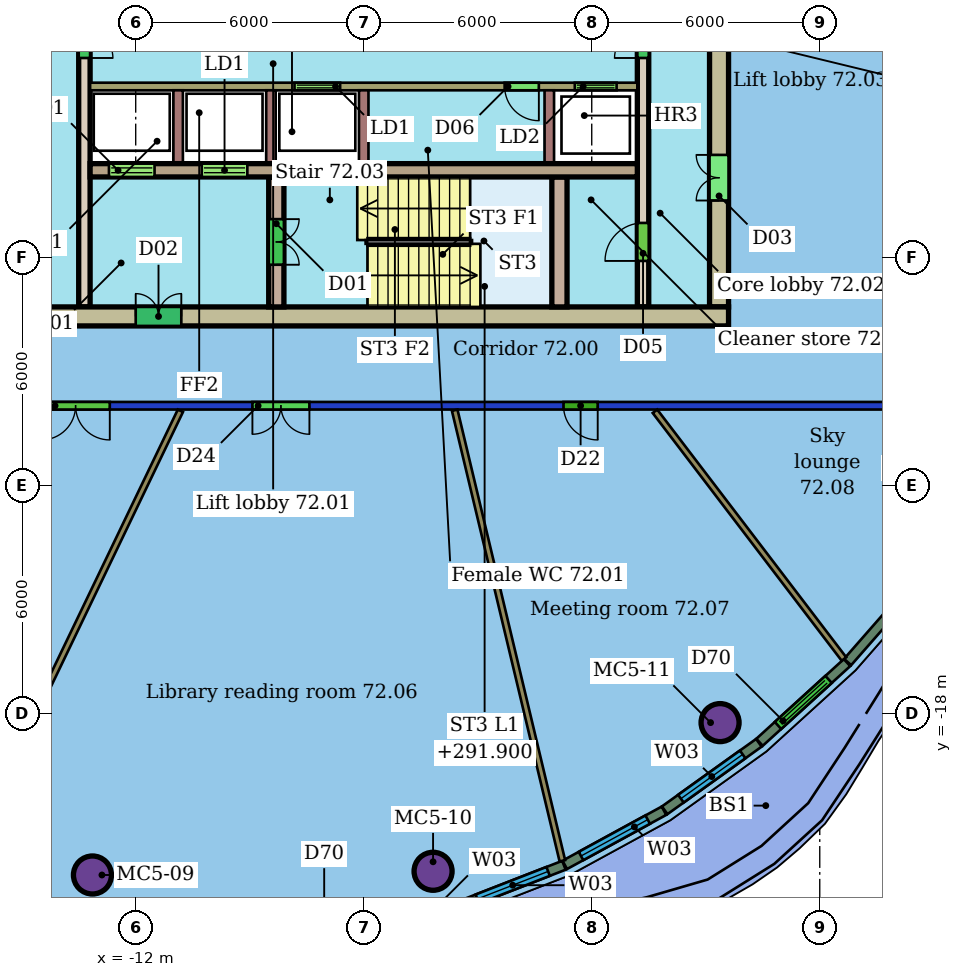
"""IFC4 building model, lengths in metres.
Left out: names, types, materials, properties, quantities, classifications, styles, units other than length and angle.
Written with IfcOpenShell. Run it as: python <this file> out.ifc"""

import sys

from ifc_helpers import new_model, si_unit, direction, frame, frame_2d, origin, origin_2d, place, context, subcontext, project, spatial, rectangle, hollow_circle, extrude, element, fill, save


model = new_model("IFC4")
c1 = context("Model", 3, precision=1e-05, world=origin(), true_north=direction((0.0, 1.0)))
c2 = subcontext(c1, "Body", "Model", "MODEL_VIEW")
j1 = project(units=[si_unit("LENGTHUNIT", "METRE"), si_unit("PLANEANGLEUNIT", "RADIAN")], contexts=[c1])
p1 = place(None, origin())
s1 = spatial("IfcSite", under=j1, at=p1, CompositionType="ELEMENT")
p2 = place(p1, origin())
s2 = spatial("IfcBuilding", under=s1, at=p2, CompositionType="ELEMENT")
p3 = place(p2, frame((0.0, 0.0, 290.1)))
s3 = spatial("IfcBuildingStorey", under=s2, at=p3, CompositionType="ELEMENT", Elevation=290.1)
for number, where, z_axis, x_axis in (
    (1, (-13.138, -22.247, 0.0), (0.0, 0.0, 1.0), (1.0, 0.0, 0.0)),
    (2, (-4.175, -22.149, 0.0), (0.0, 0.0, 1.0), (1.0, 0.0, 0.0)),
    (3, (3.377, -18.238, 0.0), (0.0, 0.0, 1.0), (1.0, 0.0, 0.0)),
):
    element("IfcColumn", number, at=place(p3, frame(where, z_axis=z_axis, x_axis=x_axis)), inside=s3, PredefinedType="COLUMN", context=c2, shape_type="SweptSolid", body=[
        extrude(hollow_circle(Radius=0.5, WallThickness=0.04, at=origin_2d()), origin(), (0.0, 0.0, 1.0), 3.45),
    ])
p4 = place(p3, frame((8.4, -9.9, 0.0), z_axis=(0.0, 0.0, 1.0), x_axis=(-1.0, 0.0, 0.0)))
e4 = element("IfcWall", 4, at=p4, inside=s3, PredefinedType="PARTITIONING", context=c2, shape_type="SweptSolid", body=[
    extrude(rectangle(XDim=28.8, YDim=0.2, at=frame_2d((14.4, 0.0))), origin(), (0.0, 0.0, 1.0), 3.1),
])
p5 = place(p4, frame((21.082, 0.0, 0.0)))
e5 = element("IfcOpeningElement", 5, at=p5, cuts=e4, PredefinedType="OPENING", context=c2, shape_type="SweptSolid", body=[
    extrude(rectangle(XDim=1.8, YDim=2.4, at=frame_2d((0.9, 1.2))), frame((0.0, 0.11, 0.0), z_axis=(0.0, -1.0, 0.0), x_axis=(1.0, 0.0, 0.0)), (0.0, 0.0, 1.0), 0.22),
])
p6 = place(p4, frame((15.829, 0.0, 0.0)))
e6 = element("IfcOpeningElement", 6, at=p6, cuts=e4, PredefinedType="OPENING", context=c2, shape_type="SweptSolid", body=[
    extrude(rectangle(XDim=1.5, YDim=2.1, at=frame_2d((0.75, 1.05))), frame((0.0, 0.11, 0.0), z_axis=(0.0, -1.0, 0.0), x_axis=(1.0, 0.0, 0.0)), (0.0, 0.0, 1.0), 0.22),
])
p7 = place(p4, frame((8.243, 0.0, 0.0)))
e7 = element("IfcOpeningElement", 7, at=p7, cuts=e4, PredefinedType="OPENING", context=c2, shape_type="SweptSolid", body=[
    extrude(rectangle(XDim=0.9, YDim=2.1, at=frame_2d((0.45, 1.05))), frame((0.0, 0.11, 0.0), z_axis=(0.0, -1.0, 0.0), x_axis=(1.0, 0.0, 0.0)), (0.0, 0.0, 1.0), 0.22),
])
p8 = place(p3, frame((-16.674, -22.198, 0.0), z_axis=(0.0, 0.0, 1.0), x_axis=(0.43334246097, 0.901229333478, 0.0)))
e8 = element("IfcWall", 8, at=p8, inside=s3, PredefinedType="PARTITIONING", context=c2, shape_type="SweptSolid", body=[
    extrude(rectangle(XDim=13.499, YDim=0.15, at=frame_2d((6.75, 0.0))), origin(), (0.0, 0.0, 1.0), 3.45),
])
p9 = place(p3, frame((-0.773, -21.874, 0.0), z_axis=(0.0, 0.0, 1.0), x_axis=(-0.232423713032, 0.972614629553, 0.0)))
e9 = element("IfcWall", 9, at=p9, inside=s3, PredefinedType="PARTITIONING", context=c2, shape_type="SweptSolid", body=[
    extrude(rectangle(XDim=12.19, YDim=0.15, at=frame_2d((6.095, 0.0))), origin(), (0.0, 0.0, 1.0), 3.45),
])
p10 = place(p3, frame((6.637, -16.564, 0.0), z_axis=(0.0, 0.0, 1.0), x_axis=(-0.606535643583, 0.795056295531, 0.0)))
e10 = element("IfcWall", 10, at=p10, inside=s3, PredefinedType="PARTITIONING", context=c2, shape_type="SweptSolid", body=[
    extrude(rectangle(XDim=8.199, YDim=0.15, at=frame_2d((4.1, 0.0))), origin(), (0.0, 0.0, 1.0), 3.45),
])
p11 = place(p3, frame((-3.428, -23.041, 0.0), z_axis=(0.0, 0.0, 1.0), x_axis=(0.931927060947, 0.362645768035, 0.0)))
e11 = element("IfcWall", 11, at=p11, inside=s3, PredefinedType="SOLIDWALL", context=c2, shape_type="SweptSolid", body=[
    extrude(rectangle(XDim=2.894, YDim=0.25, at=frame_2d((1.447, 0.0))), origin(), (0.0, 0.0, 1.0), 3.15),
])
p12 = place(p11, frame((0.447, 0.0, 0.9)))
e12 = element("IfcOpeningElement", 12, at=p12, cuts=e11, PredefinedType="OPENING", context=c2, shape_type="SweptSolid", body=[
    extrude(rectangle(XDim=2.0, YDim=2.1, at=frame_2d((1.0, 1.05))), frame((0.0, 0.135, 0.0), z_axis=(0.0, -1.0, 0.0), x_axis=(1.0, 0.0, 0.0)), (0.0, 0.0, 1.0), 0.27),
])
p13 = place(p3, frame((-0.709, -21.981, 0.0), z_axis=(0.0, 0.0, 1.0), x_axis=(0.877823384271, 0.478984452802, 0.0)))
e13 = element("IfcWall", 13, at=p13, inside=s3, PredefinedType="SOLIDWALL", context=c2, shape_type="SweptSolid", body=[
    extrude(rectangle(XDim=2.973, YDim=0.25, at=frame_2d((1.487, 0.0))), origin(), (0.0, 0.0, 1.0), 3.15),
])
p14 = place(p13, frame((0.487, 0.0, 0.9)))
e14 = element("IfcOpeningElement", 14, at=p14, cuts=e13, PredefinedType="OPENING", context=c2, shape_type="SweptSolid", body=[
    extrude(rectangle(XDim=2.0, YDim=2.1, at=frame_2d((1.0, 1.05))), frame((0.0, 0.135, 0.0), z_axis=(0.0, -1.0, 0.0), x_axis=(1.0, 0.0, 0.0)), (0.0, 0.0, 1.0), 0.27),
])
p15 = place(p3, frame((1.92, -20.544, 0.0), z_axis=(0.0, 0.0, 1.0), x_axis=(0.812910032744, 0.582389284469, 0.0)))
e15 = element("IfcWall", 15, at=p15, inside=s3, PredefinedType="SOLIDWALL", context=c2, shape_type="SweptSolid", body=[
    extrude(rectangle(XDim=3.048, YDim=0.25, at=frame_2d((1.524, 0.0))), origin(), (0.0, 0.0, 1.0), 3.15),
])
p16 = place(p15, frame((0.524, 0.0, 0.9)))
e16 = element("IfcOpeningElement", 16, at=p16, cuts=e15, PredefinedType="OPENING", context=c2, shape_type="SweptSolid", body=[
    extrude(rectangle(XDim=2.0, YDim=2.1, at=frame_2d((1.0, 1.05))), frame((0.0, 0.135, 0.0), z_axis=(0.0, -1.0, 0.0), x_axis=(1.0, 0.0, 0.0)), (0.0, 0.0, 1.0), 0.27),
])
p17 = place(p3, frame((4.416, -18.755, 0.0), z_axis=(0.0, 0.0, 1.0), x_axis=(0.739421840392, 0.673242409502, 0.0)))
e17 = element("IfcWall", 17, at=p17, inside=s3, PredefinedType="SOLIDWALL", context=c2, shape_type="SweptSolid", body=[
    extrude(rectangle(XDim=3.114, YDim=0.25, at=frame_2d((1.557, 0.0))), origin(), (0.0, 0.0, 1.0), 3.15),
])
p18 = place(p17, frame((0.657, 0.0, 0.0)))
e18 = element("IfcOpeningElement", 18, at=p18, cuts=e17, PredefinedType="OPENING", context=c2, shape_type="SweptSolid", body=[
    extrude(rectangle(XDim=1.8, YDim=2.4, at=frame_2d((0.9, 1.2))), frame((0.0, 0.135, 0.0), z_axis=(0.0, -1.0, 0.0), x_axis=(1.0, 0.0, 0.0)), (0.0, 0.0, 1.0), 0.27),
])
p19 = place(p3, frame((6.733, -16.643, 0.0), z_axis=(0.0, 0.0, 1.0), x_axis=(0.658963977512, 0.752174498598, 0.0)))
e19 = element("IfcWall", 19, at=p19, inside=s3, PredefinedType="SOLIDWALL", context=c2, shape_type="SweptSolid", body=[
    extrude(rectangle(XDim=3.122, YDim=0.25, at=frame_2d((1.561, 0.0))), origin(), (0.0, 0.0, 1.0), 3.15),
])
p20 = place(p3, frame((-15.6, -7.55, 0.0), z_axis=(0.0, 0.0, 1.0), x_axis=(1.0, 0.0, 0.0)))
e20 = element("IfcWall", 20, at=p20, inside=s3, PredefinedType="SHEAR", context=c2, shape_type="SweptSolid", body=[
    extrude(rectangle(XDim=19.2, YDim=0.5, at=frame_2d((9.6, 0.0))), origin(), (0.0, 0.0, 1.0), 3.3),
])
p21 = place(p20, frame((3.6, 0.0, 0.0)))
e21 = element("IfcOpeningElement", 21, at=p21, cuts=e20, PredefinedType="OPENING", context=c2, shape_type="SweptSolid", body=[
    extrude(rectangle(XDim=1.2, YDim=2.1, at=frame_2d((0.6, 1.05))), frame((0.0, 0.26, 0.0), z_axis=(0.0, -1.0, 0.0), x_axis=(1.0, 0.0, 0.0)), (0.0, 0.0, 1.0), 0.52),
])
p22 = place(p3, frame((3.35, -7.3, 0.0), z_axis=(0.0, 0.0, 1.0), x_axis=(0.0, 1.0, 0.0)))
e22 = element("IfcWall", 22, at=p22, inside=s3, PredefinedType="SHEAR", context=c2, shape_type="SweptSolid", body=[
    extrude(rectangle(XDim=14.6, YDim=0.5, at=frame_2d((7.3, 0.0))), origin(), (0.0, 0.0, 1.0), 3.3),
])
p23 = place(p22, frame((2.8, 0.0, 0.0)))
e23 = element("IfcOpeningElement", 23, at=p23, cuts=e22, PredefinedType="OPENING", context=c2, shape_type="SweptSolid", body=[
    extrude(rectangle(XDim=1.2, YDim=2.1, at=frame_2d((0.6, 1.05))), frame((0.0, 0.26, 0.0), z_axis=(0.0, -1.0, 0.0), x_axis=(1.0, 0.0, 0.0)), (0.0, 0.0, 1.0), 0.52),
])
p24 = place(p22, frame((10.6, 0.0, 0.0)))
e24 = element("IfcOpeningElement", 24, at=p24, cuts=e22, PredefinedType="OPENING", context=c2, shape_type="SweptSolid", body=[
    extrude(rectangle(XDim=1.2, YDim=2.1, at=frame_2d((0.6, 1.05))), frame((0.0, 0.26, 0.0), z_axis=(0.0, -1.0, 0.0), x_axis=(1.0, 0.0, 0.0)), (0.0, 0.0, 1.0), 0.52),
])
p25 = place(p3, frame((-13.2, -3.705, 0.0), z_axis=(0.0, 0.0, 1.0), x_axis=(1.0, 0.0, 0.0)))
e25 = element("IfcWall", 25, at=p25, inside=s3, PredefinedType="SHEAR", context=c2, shape_type="SweptSolid", body=[
    extrude(rectangle(XDim=7.2, YDim=0.35, at=frame_2d((3.6, 0.0))), origin(), (0.0, 0.0, 1.0), 3.3),
])
p26 = place(p25, frame((0.496, 0.0, 0.0)))
e26 = element("IfcOpeningElement", 26, at=p26, cuts=e25, PredefinedType="OPENING", context=c2, shape_type="SweptSolid", body=[
    extrude(rectangle(XDim=1.2, YDim=2.1, at=frame_2d((0.6, 1.05))), frame((0.0, 0.185, 0.0), z_axis=(0.0, -1.0, 0.0), x_axis=(1.0, 0.0, 0.0)), (0.0, 0.0, 1.0), 0.37),
])
p27 = place(p25, frame((2.938, 0.0, 0.0)))
e27 = element("IfcOpeningElement", 27, at=p27, cuts=e25, PredefinedType="OPENING", context=c2, shape_type="SweptSolid", body=[
    extrude(rectangle(XDim=1.2, YDim=2.1, at=frame_2d((0.6, 1.05))), frame((0.0, 0.185, 0.0), z_axis=(0.0, -1.0, 0.0), x_axis=(1.0, 0.0, 0.0)), (0.0, 0.0, 1.0), 0.37),
])
p28 = place(p3, frame((-6.0, -3.705, 0.0), z_axis=(0.0, 0.0, 1.0), x_axis=(1.0, 0.0, 0.0)))
e28 = element("IfcWall", 28, at=p28, inside=s3, PredefinedType="SHEAR", context=c2, shape_type="SweptSolid", body=[
    extrude(rectangle(XDim=7.2, YDim=0.35, at=frame_2d((3.6, 0.0))), origin(), (0.0, 0.0, 1.0), 3.3),
])
p29 = place(p3, frame((-13.35, 7.3, 0.0), z_axis=(0.0, 0.0, 1.0), x_axis=(0.0, -1.0, 0.0)))
e29 = element("IfcWall", 29, at=p29, inside=s3, PredefinedType="SHEAR", context=c2, shape_type="SweptSolid", body=[
    extrude(rectangle(XDim=14.6, YDim=0.3, at=frame_2d((7.3, 0.0))), origin(), (0.0, 0.0, 1.0), 3.3),
])
p30 = place(p29, frame((6.55, 0.0, 0.0)))
e30 = element("IfcOpeningElement", 30, at=p30, cuts=e29, PredefinedType="OPENING", context=c2, shape_type="SweptSolid", body=[
    extrude(rectangle(XDim=1.5, YDim=2.1, at=frame_2d((0.75, 1.05))), frame((0.0, 0.16, 0.0), z_axis=(0.0, -1.0, 0.0), x_axis=(1.0, 0.0, 0.0)), (0.0, 0.0, 1.0), 0.32),
])
p31 = place(p3, frame((1.35, -7.3, 0.0), z_axis=(0.0, 0.0, 1.0), x_axis=(0.0, 1.0, 0.0)))
e31 = element("IfcWall", 31, at=p31, inside=s3, PredefinedType="SHEAR", context=c2, shape_type="SweptSolid", body=[
    extrude(rectangle(XDim=14.6, YDim=0.3, at=frame_2d((7.3, 0.0))), origin(), (0.0, 0.0, 1.0), 3.3),
])
p32 = place(p31, frame((1.21, 0.0, 0.0)))
e32 = element("IfcOpeningElement", 32, at=p32, cuts=e31, PredefinedType="OPENING", context=c2, shape_type="SweptSolid", body=[
    extrude(rectangle(XDim=1.0, YDim=2.1, at=frame_2d((0.5, 1.05))), frame((0.0, 0.16, 0.0), z_axis=(0.0, -1.0, 0.0), x_axis=(1.0, 0.0, 0.0)), (0.0, 0.0, 1.0), 0.32),
])
p33 = place(p31, frame((6.55, 0.0, 0.0)))
e33 = element("IfcOpeningElement", 33, at=p33, cuts=e31, PredefinedType="OPENING", context=c2, shape_type="SweptSolid", body=[
    extrude(rectangle(XDim=1.5, YDim=2.1, at=frame_2d((0.75, 1.05))), frame((0.0, 0.16, 0.0), z_axis=(0.0, -1.0, 0.0), x_axis=(1.0, 0.0, 0.0)), (0.0, 0.0, 1.0), 0.32),
])
p34 = place(p3, frame((1.2, -1.5, 0.0), z_axis=(0.0, 0.0, 1.0), x_axis=(-1.0, 0.0, 0.0)))
e34 = element("IfcWall", 34, at=p34, inside=s3, PredefinedType="SHEAR", context=c2, shape_type="SweptSolid", body=[
    extrude(rectangle(XDim=14.4, YDim=0.2, at=frame_2d((7.2, 0.0))), origin(), (0.0, 0.0, 1.0), 3.3),
])
p35 = place(p34, frame((7.821, 0.0, 0.0)))
e35 = element("IfcOpeningElement", 35, at=p35, cuts=e34, PredefinedType="OPENING", context=c2, shape_type="SweptSolid", body=[
    extrude(rectangle(XDim=1.2, YDim=2.1, at=frame_2d((0.6, 1.05))), frame((0.0, 0.11, 0.0), z_axis=(0.0, -1.0, 0.0), x_axis=(1.0, 0.0, 0.0)), (0.0, 0.0, 1.0), 0.22),
])
p36 = place(p34, frame((0.546, 0.0, 0.0)))
e36 = element("IfcOpeningElement", 36, at=p36, cuts=e34, PredefinedType="OPENING", context=c2, shape_type="SweptSolid", body=[
    extrude(rectangle(XDim=1.1, YDim=2.1, at=frame_2d((0.55, 1.05))), frame((0.0, 0.11, 0.0), z_axis=(0.0, -1.0, 0.0), x_axis=(1.0, 0.0, 0.0)), (0.0, 0.0, 1.0), 0.22),
])
p37 = place(p34, frame((2.592, 0.0, 0.0)))
e37 = element("IfcOpeningElement", 37, at=p37, cuts=e34, PredefinedType="OPENING", context=c2, shape_type="SweptSolid", body=[
    extrude(rectangle(XDim=0.9, YDim=2.1, at=frame_2d((0.45, 1.05))), frame((0.0, 0.11, 0.0), z_axis=(0.0, -1.0, 0.0), x_axis=(1.0, 0.0, 0.0)), (0.0, 0.0, 1.0), 0.22),
])
p38 = place(p3, frame((-8.3, -3.88, 0.0), z_axis=(0.0, 0.0, 1.0), x_axis=(0.0, -1.0, 0.0)))
e38 = element("IfcWall", 38, at=p38, inside=s3, PredefinedType="SHEAR", context=c2, shape_type="SweptSolid", body=[
    extrude(rectangle(XDim=3.42, YDim=0.4, at=frame_2d((1.71, 0.0))), origin(), (0.0, 0.0, 1.0), 3.3),
])
p39 = place(p38, frame((1.11, 0.0, 0.0)))
e39 = element("IfcOpeningElement", 39, at=p39, cuts=e38, PredefinedType="OPENING", context=c2, shape_type="SweptSolid", body=[
    extrude(rectangle(XDim=1.2, YDim=2.1, at=frame_2d((0.6, 1.05))), frame((0.0, 0.21, 0.0), z_axis=(0.0, -1.0, 0.0), x_axis=(1.0, 0.0, 0.0)), (0.0, 0.0, 1.0), 0.42),
])
p40 = place(p3, frame((-0.85, -3.88, 0.0), z_axis=(0.0, 0.0, 1.0), x_axis=(0.0, -1.0, 0.0)))
e40 = element("IfcWall", 40, at=p40, inside=s3, PredefinedType="SHEAR", context=c2, shape_type="SweptSolid", body=[
    extrude(rectangle(XDim=3.42, YDim=0.4, at=frame_2d((1.71, 0.0))), origin(), (0.0, 0.0, 1.0), 3.3),
])
for number, where, z_axis, x_axis in (
    (41, (-10.883, -1.6, 0.0), (0.0, 0.0, 1.0), (0.0, -1.0, 0.0)),
    (42, (-8.442, -1.6, 0.0), (0.0, 0.0, 1.0), (0.0, -1.0, 0.0)),
    (43, (-6.0, -1.6, 0.0), (0.0, 0.0, 1.0), (0.0, -1.0, 0.0)),
    (44, (-1.117, -1.6, 0.0), (0.0, 0.0, 1.0), (0.0, -1.0, 0.0)),
):
    element("IfcWall", number, at=place(p3, frame(where, z_axis=z_axis, x_axis=x_axis)), inside=s3, PredefinedType="SHEAR", context=c2, shape_type="SweptSolid", body=[
        extrude(rectangle(XDim=1.93, YDim=0.25, at=frame_2d((0.965, 0.0))), origin(), (0.0, 0.0, 1.0), 3.3),
    ])
p41 = place(p5, origin())
e45 = element("IfcDoor", 45, at=p41, inside=s3, OperationType="DOUBLE_DOOR_SINGLE_SWING", PredefinedType="DOOR", context=c2, shape_type="SweptSolid", body=[
    extrude(rectangle(XDim=1.8, YDim=2.4, at=frame_2d((0.9, 1.2))), frame((0.0, 0.025, 0.0), z_axis=(0.0, -1.0, 0.0), x_axis=(1.0, 0.0, 0.0)), (0.0, 0.0, 1.0), 0.05),
])
fill(e5, e45)
p42 = place(p6, origin())
e46 = element("IfcDoor", 46, at=p42, inside=s3, OperationType="DOUBLE_DOOR_SINGLE_SWING", PredefinedType="DOOR", context=c2, shape_type="SweptSolid", body=[
    extrude(rectangle(XDim=1.5, YDim=2.1, at=frame_2d((0.75, 1.05))), frame((0.0, 0.025, 0.0), z_axis=(0.0, -1.0, 0.0), x_axis=(1.0, 0.0, 0.0)), (0.0, 0.0, 1.0), 0.05),
])
fill(e6, e46)
p43 = place(p7, origin())
e47 = element("IfcDoor", 47, at=p43, inside=s3, OperationType="SINGLE_SWING_LEFT", PredefinedType="DOOR", context=c2, shape_type="SweptSolid", body=[
    extrude(rectangle(XDim=0.9, YDim=2.1, at=frame_2d((0.45, 1.05))), frame((0.0, 0.025, 0.0), z_axis=(0.0, -1.0, 0.0), x_axis=(1.0, 0.0, 0.0)), (0.0, 0.0, 1.0), 0.05),
])
fill(e7, e47)
p44 = place(p12, origin())
e48 = element("IfcWindow", 48, at=p44, inside=s3, PartitioningType="SINGLE_PANEL", PredefinedType="WINDOW", context=c2, shape_type="SweptSolid", body=[
    extrude(rectangle(XDim=2.0, YDim=2.1, at=frame_2d((1.0, 1.05))), frame((0.0, 0.03, 0.0), z_axis=(0.0, -1.0, 0.0), x_axis=(1.0, 0.0, 0.0)), (0.0, 0.0, 1.0), 0.06),
])
fill(e12, e48)
p45 = place(p14, origin())
e49 = element("IfcWindow", 49, at=p45, inside=s3, PartitioningType="SINGLE_PANEL", PredefinedType="WINDOW", context=c2, shape_type="SweptSolid", body=[
    extrude(rectangle(XDim=2.0, YDim=2.1, at=frame_2d((1.0, 1.05))), frame((0.0, 0.03, 0.0), z_axis=(0.0, -1.0, 0.0), x_axis=(1.0, 0.0, 0.0)), (0.0, 0.0, 1.0), 0.06),
])
fill(e14, e49)
p46 = place(p16, origin())
e50 = element("IfcWindow", 50, at=p46, inside=s3, PartitioningType="SINGLE_PANEL", PredefinedType="WINDOW", context=c2, shape_type="SweptSolid", body=[
    extrude(rectangle(XDim=2.0, YDim=2.1, at=frame_2d((1.0, 1.05))), frame((0.0, 0.03, 0.0), z_axis=(0.0, -1.0, 0.0), x_axis=(1.0, 0.0, 0.0)), (0.0, 0.0, 1.0), 0.06),
])
fill(e16, e50)
p47 = place(p18, origin())
e51 = element("IfcDoor", 51, at=p47, inside=s3, OperationType="DOUBLE_DOOR_SLIDING", PredefinedType="DOOR", context=c2, shape_type="SweptSolid", body=[
    extrude(rectangle(XDim=1.8, YDim=2.4, at=frame_2d((0.9, 1.2))), frame((0.0, 0.025, 0.0), z_axis=(0.0, -1.0, 0.0), x_axis=(1.0, 0.0, 0.0)), (0.0, 0.0, 1.0), 0.05),
])
fill(e18, e51)
p48 = place(p21, origin())
e52 = element("IfcDoor", 52, at=p48, inside=s3, OperationType="DOUBLE_DOOR_SINGLE_SWING", PredefinedType="NOTDEFINED", context=c2, shape_type="SweptSolid", body=[
    extrude(rectangle(XDim=1.2, YDim=2.1, at=frame_2d((0.6, 1.05))), frame((0.0, 0.025, 0.0), z_axis=(0.0, -1.0, 0.0), x_axis=(1.0, 0.0, 0.0)), (0.0, 0.0, 1.0), 0.05),
])
fill(e21, e52)
p49 = place(p23, origin())
e53 = element("IfcDoor", 53, at=p49, inside=s3, OperationType="DOUBLE_DOOR_SINGLE_SWING", PredefinedType="NOTDEFINED", context=c2, shape_type="SweptSolid", body=[
    extrude(rectangle(XDim=1.2, YDim=2.1, at=frame_2d((0.6, 1.05))), frame((0.0, 0.025, 0.0), z_axis=(0.0, -1.0, 0.0), x_axis=(1.0, 0.0, 0.0)), (0.0, 0.0, 1.0), 0.05),
])
fill(e23, e53)
p50 = place(p26, origin())
e54 = element("IfcDoor", 54, at=p50, inside=s3, OperationType="DOUBLE_DOOR_SLIDING", PredefinedType="NOTDEFINED", context=c2, shape_type="SweptSolid", body=[
    extrude(rectangle(XDim=1.2, YDim=2.1, at=frame_2d((0.6, 1.05))), frame((0.0, 0.025, 0.0), z_axis=(0.0, -1.0, 0.0), x_axis=(1.0, 0.0, 0.0)), (0.0, 0.0, 1.0), 0.05),
])
fill(e26, e54)
p51 = place(p27, origin())
e55 = element("IfcDoor", 55, at=p51, inside=s3, OperationType="DOUBLE_DOOR_SLIDING", PredefinedType="NOTDEFINED", context=c2, shape_type="SweptSolid", body=[
    extrude(rectangle(XDim=1.2, YDim=2.1, at=frame_2d((0.6, 1.05))), frame((0.0, 0.025, 0.0), z_axis=(0.0, -1.0, 0.0), x_axis=(1.0, 0.0, 0.0)), (0.0, 0.0, 1.0), 0.05),
])
fill(e27, e55)
p52 = place(p30, origin())
e56 = element("IfcDoor", 56, at=p52, inside=s3, OperationType="DOUBLE_DOOR_SINGLE_SWING", PredefinedType="NOTDEFINED", context=c2, shape_type="SweptSolid", body=[
    extrude(rectangle(XDim=1.5, YDim=2.1, at=frame_2d((0.75, 1.05))), frame((0.0, 0.025, 0.0), z_axis=(0.0, -1.0, 0.0), x_axis=(1.0, 0.0, 0.0)), (0.0, 0.0, 1.0), 0.05),
])
fill(e30, e56)
p53 = place(p32, origin())
e57 = element("IfcDoor", 57, at=p53, inside=s3, OperationType="SINGLE_SWING_LEFT", PredefinedType="NOTDEFINED", context=c2, shape_type="SweptSolid", body=[
    extrude(rectangle(XDim=1.0, YDim=2.1, at=frame_2d((0.5, 1.05))), frame((0.0, 0.025, 0.0), z_axis=(0.0, -1.0, 0.0), x_axis=(1.0, 0.0, 0.0)), (0.0, 0.0, 1.0), 0.05),
])
fill(e32, e57)
p54 = place(p33, origin())
e58 = element("IfcDoor", 58, at=p54, inside=s3, OperationType="DOUBLE_DOOR_SINGLE_SWING", PredefinedType="NOTDEFINED", context=c2, shape_type="SweptSolid", body=[
    extrude(rectangle(XDim=1.5, YDim=2.1, at=frame_2d((0.75, 1.05))), frame((0.0, 0.025, 0.0), z_axis=(0.0, -1.0, 0.0), x_axis=(1.0, 0.0, 0.0)), (0.0, 0.0, 1.0), 0.05),
])
fill(e33, e58)
p55 = place(p35, origin())
e59 = element("IfcDoor", 59, at=p55, inside=s3, OperationType="DOUBLE_DOOR_SLIDING", PredefinedType="NOTDEFINED", context=c2, shape_type="SweptSolid", body=[
    extrude(rectangle(XDim=1.2, YDim=2.1, at=frame_2d((0.6, 1.05))), frame((0.0, 0.025, 0.0), z_axis=(0.0, -1.0, 0.0), x_axis=(1.0, 0.0, 0.0)), (0.0, 0.0, 1.0), 0.05),
])
fill(e35, e59)
p56 = place(p36, origin())
e60 = element("IfcDoor", 60, at=p56, inside=s3, OperationType="DOUBLE_DOOR_SLIDING", PredefinedType="NOTDEFINED", context=c2, shape_type="SweptSolid", body=[
    extrude(rectangle(XDim=1.1, YDim=2.1, at=frame_2d((0.55, 1.05))), frame((0.0, 0.025, 0.0), z_axis=(0.0, -1.0, 0.0), x_axis=(1.0, 0.0, 0.0)), (0.0, 0.0, 1.0), 0.05),
])
fill(e36, e60)
p57 = place(p37, origin())
e61 = element("IfcDoor", 61, at=p57, inside=s3, OperationType="SINGLE_SWING_LEFT", PredefinedType="NOTDEFINED", context=c2, shape_type="SweptSolid", body=[
    extrude(rectangle(XDim=0.9, YDim=2.1, at=frame_2d((0.45, 1.05))), frame((0.0, 0.025, 0.0), z_axis=(0.0, -1.0, 0.0), x_axis=(1.0, 0.0, 0.0)), (0.0, 0.0, 1.0), 0.05),
])
fill(e37, e61)
p58 = place(p39, origin())
e62 = element("IfcDoor", 62, at=p58, inside=s3, OperationType="DOUBLE_DOOR_SINGLE_SWING", PredefinedType="NOTDEFINED", context=c2, shape_type="SweptSolid", body=[
    extrude(rectangle(XDim=1.2, YDim=2.1, at=frame_2d((0.6, 1.05))), frame((0.0, 0.025, 0.0), z_axis=(0.0, -1.0, 0.0), x_axis=(1.0, 0.0, 0.0)), (0.0, 0.0, 1.0), 0.05),
])
fill(e39, e62)
save(model, sys.argv[1])
